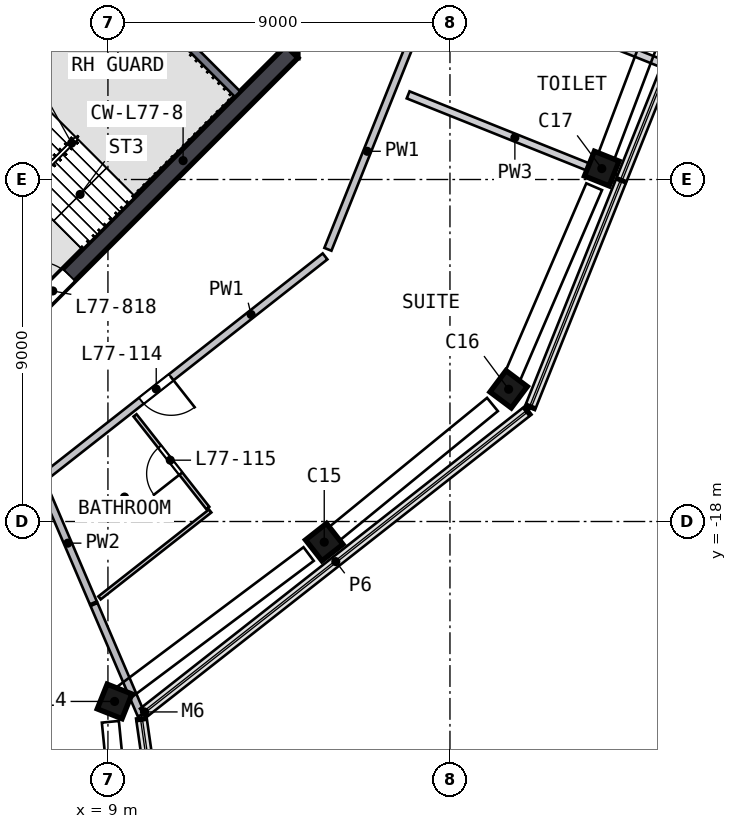
"""IFC4 building model, lengths in metres.
Left out: names, types, materials, properties, quantities, classifications, styles, units other than length and angle.
Written with IfcOpenShell. Run it as: python <this file> out.ifc"""

import sys

from ifc_helpers import new_model, si_unit, direction, frame, frame_2d, origin, origin_2d, place, context, subcontext, project, spatial, rectangle, extrude, element, fill, save


model = new_model("IFC4")
c1 = context("Model", 3, precision=1e-05, world=origin(), true_north=direction((0.0, 1.0)))
c2 = subcontext(c1, "Body", "Model", "MODEL_VIEW")
j1 = project(units=[si_unit("LENGTHUNIT", "METRE"), si_unit("PLANEANGLEUNIT", "RADIAN")], contexts=[c1])
p1 = place(None, origin())
s1 = spatial("IfcSite", under=j1, at=p1, CompositionType="ELEMENT")
p2 = place(p1, origin())
s2 = spatial("IfcBuilding", under=s1, at=p2, CompositionType="ELEMENT")
p3 = place(p2, frame((0.0, 0.0, 310.0)))
s3 = spatial("IfcBuildingStorey", under=s2, at=p3, CompositionType="ELEMENT", Elevation=310.0)
p4 = place(p3, frame((9.084, -22.772, 0.0), z_axis=(0.075798181, 0.03094343, 0.996642935), x_axis=(-0.36863657, -0.927834001, 0.056843175)))
e1 = element("IfcColumn", 1, at=p4, inside=s3, PredefinedType="COLUMN", context=c2, shape_type="SweptSolid", body=[
    extrude(rectangle(XDim=0.7, YDim=0.7, at=origin_2d()), origin(), (0.0, 0.0, 1.0), 4.615),
])
p5 = place(p3, frame((14.617, -18.602, 0.0), z_axis=(0.061742286, 0.049362085, 0.996870741), x_axis=(0.783840682, 0.615910303, -0.079046088)))
e2 = element("IfcColumn", 2, at=p5, inside=s3, PredefinedType="COLUMN", context=c2, shape_type="SweptSolid", body=[
    extrude(rectangle(XDim=0.7, YDim=0.7, at=origin_2d()), origin(), (0.0, 0.0, 1.0), 4.615),
])
p6 = place(p3, frame((19.486, -14.599, 0.0), z_axis=(0.048189355, 0.065486741, 0.996689156), x_axis=(-0.597475305, -0.797754975, 0.081303506)))
e3 = element("IfcColumn", 3, at=p6, inside=s3, PredefinedType="COLUMN", context=c2, shape_type="SweptSolid", body=[
    extrude(rectangle(XDim=0.7, YDim=0.7, at=origin_2d()), origin(), (0.0, 0.0, 1.0), 4.615),
])
p7 = place(p3, frame((21.96, -8.801, 0.0), z_axis=(0.028781386, 0.07359358, 0.996872919), x_axis=(0.370897286, 0.925306036, -0.079018619)))
e4 = element("IfcColumn", 4, at=p7, inside=s3, PredefinedType="COLUMN", context=c2, shape_type="SweptSolid", body=[
    extrude(rectangle(XDim=0.7, YDim=0.7, at=origin_2d()), origin(), (0.0, 0.0, 1.0), 4.615),
])
p8 = place(p3, frame((13.775, -5.799, 0.0), z_axis=(0.0, 0.0, 1.0), x_axis=(0.0, 1.0, 0.0)))
e5 = element("IfcWall", 5, at=p8, inside=s3, PredefinedType="SHEAR", context=c2, shape_type="SweptSolid", body=[
    extrude(rectangle(XDim=11.598, YDim=0.45, at=frame_2d((5.799, 0.0))), origin(), (0.0, 0.0, 1.0), 5.0),
])
p9 = place(p8, frame((4.899, 0.0, 0.0)))
e6 = element("IfcOpeningElement", 6, at=p9, cuts=e5, PredefinedType="OPENING", context=c2, shape_type="SweptSolid", body=[
    extrude(rectangle(XDim=1.8, YDim=2.1, at=frame_2d((0.9, 1.05))), frame((0.0, 0.235, 0.0), z_axis=(0.0, -1.0, 0.0), x_axis=(1.0, 0.0, 0.0)), (0.0, 0.0, 1.0), 0.47),
])
p10 = place(p3, frame((5.64, -13.841, 0.0), z_axis=(0.0, 0.0, 1.0), x_axis=(0.707106781, 0.707106781, 0.0)))
e7 = element("IfcWall", 7, at=p10, inside=s3, PredefinedType="SHEAR", context=c2, shape_type="SweptSolid", body=[
    extrude(rectangle(XDim=11.598, YDim=0.45, at=frame_2d((5.799, 0.0))), origin(), (0.0, 0.0, 1.0), 5.0),
])
p11 = place(p10, frame((2.099, 0.0, 0.0)))
e8 = element("IfcOpeningElement", 8, at=p11, cuts=e7, PredefinedType="OPENING", context=c2, shape_type="SweptSolid", body=[
    extrude(rectangle(XDim=1.2, YDim=2.1, at=frame_2d((0.6, 1.05))), frame((0.0, 0.235, 0.0), z_axis=(0.0, -1.0, 0.0), x_axis=(1.0, 0.0, 0.0)), (0.0, 0.0, 1.0), 0.47),
])
p12 = place(p3, frame((9.629, -3.24, 0.0), z_axis=(0.0, 0.0, 1.0), x_axis=(-0.707120946, -0.707092617, 0.0)))
e9 = element("IfcWall", 9, at=p12, inside=s3, PredefinedType="SOLIDWALL", context=c2, shape_type="SweptSolid", body=[
    extrude(rectangle(XDim=8.618, YDim=0.2, at=frame_2d((4.309, 0.0))), origin(), (0.0, 0.0, 1.0), 4.6),
])
p13 = place(p12, frame((7.018, 0.0, 0.0)))
e10 = element("IfcOpeningElement", 10, at=p13, cuts=e9, PredefinedType="OPENING", context=c2, shape_type="SweptSolid", body=[
    extrude(rectangle(XDim=1.2, YDim=2.1, at=frame_2d((0.6, 1.05))), frame((0.0, 0.11, 0.0), z_axis=(0.0, -1.0, 0.0), x_axis=(1.0, 0.0, 0.0)), (0.0, 0.0, 1.0), 0.22),
])
p14 = place(p3, frame((9.334, -3.677, 0.0), z_axis=(0.0, 0.0, 1.0), x_axis=(0.707106781, -0.707106781, 0.0)))
e11 = element("IfcWall", 11, at=p14, inside=s3, PredefinedType="SOLIDWALL", context=c2, shape_type="SweptSolid", body=[
    extrude(rectangle(XDim=4.35, YDim=0.2, at=frame_2d((2.175, 0.0))), origin(), (0.0, 0.0, 1.0), 4.6),
])
p15 = place(p3, frame((14.713, -11.023, 0.0), z_axis=(0.0, 0.0, 1.0), x_axis=(-0.78628742, -0.617860902, 0.0)))
e12 = element("IfcWall", 12, at=p15, inside=s3, PredefinedType="SOLIDWALL", context=c2, shape_type="SweptSolid", body=[
    extrude(rectangle(XDim=9.316, YDim=0.2, at=frame_2d((4.658, 0.0))), origin(), (0.0, 0.0, 1.0), 4.6),
])
p16 = place(p15, frame((5.15, 0.0, 0.0)))
e13 = element("IfcOpeningElement", 13, at=p16, cuts=e12, PredefinedType="OPENING", context=c2, shape_type="SweptSolid", body=[
    extrude(rectangle(XDim=1.0, YDim=2.1, at=frame_2d((0.5, 1.05))), frame((0.0, 0.11, 0.0), z_axis=(0.0, -1.0, 0.0), x_axis=(1.0, 0.0, 0.0)), (0.0, 0.0, 1.0), 0.22),
])
p17 = place(p3, frame((18.179, -2.375, 0.0), z_axis=(0.0, 0.0, 1.0), x_axis=(-0.37202319, -0.928223435, 0.0)))
e14 = element("IfcWall", 14, at=p17, inside=s3, PredefinedType="SOLIDWALL", context=c2, shape_type="SweptSolid", body=[
    extrude(rectangle(XDim=9.116, YDim=0.2, at=frame_2d((4.558, 0.0))), origin(), (0.0, 0.0, 1.0), 4.6),
])
p18 = place(p17, frame((2.458, 0.0, 0.0)))
e15 = element("IfcOpeningElement", 15, at=p18, cuts=e14, PredefinedType="OPENING", context=c2, shape_type="SweptSolid", body=[
    extrude(rectangle(XDim=0.9, YDim=2.1, at=frame_2d((0.45, 1.05))), frame((0.0, 0.11, 0.0), z_axis=(0.0, -1.0, 0.0), x_axis=(1.0, 0.0, 0.0)), (0.0, 0.0, 1.0), 0.22),
])
p19 = place(p17, frame((0.2, 0.0, 0.0)))
e16 = element("IfcOpeningElement", 16, at=p19, cuts=e14, PredefinedType="OPENING", context=c2, shape_type="SweptSolid", body=[
    extrude(rectangle(XDim=0.9, YDim=2.1, at=frame_2d((0.45, 1.05))), frame((0.0, 0.11, 0.0), z_axis=(0.0, -1.0, 0.0), x_axis=(1.0, 0.0, 0.0)), (0.0, 0.0, 1.0), 0.22),
])
p20 = place(p3, frame((7.271, -16.998, 0.0), z_axis=(0.0, 0.0, 1.0), x_axis=(0.393290003, -0.919414473, 0.0)))
e17 = element("IfcWall", 17, at=p20, inside=s3, PredefinedType="SOLIDWALL", context=c2, shape_type="SweptSolid", body=[
    extrude(rectangle(XDim=3.418, YDim=0.2, at=frame_2d((1.709, 0.0))), origin(), (0.0, 0.0, 1.0), 4.6),
])
p21 = place(p3, frame((8.634, -20.184, 0.0), z_axis=(0.0, 0.0, 1.0), x_axis=(0.393322695, -0.919400488, 0.0)))
e18 = element("IfcWall", 18, at=p21, inside=s3, PredefinedType="SOLIDWALL", context=c2, shape_type="SweptSolid", body=[
    extrude(rectangle(XDim=3.161, YDim=0.2, at=frame_2d((1.581, 0.0))), origin(), (0.0, 0.0, 1.0), 4.6),
])
p22 = place(p3, frame((11.69, -17.723, 0.0), z_axis=(0.0, 0.0, 1.0), x_axis=(-0.786279455, -0.617871038, 0.0)))
e19 = element("IfcWall", 19, at=p22, inside=s3, PredefinedType="PARTITIONING", context=c2, shape_type="SweptSolid", body=[
    extrude(rectangle(XDim=3.704, YDim=0.1, at=frame_2d((1.852, 0.0))), origin(), (0.0, 0.0, 1.0), 4.6),
])
p23 = place(p3, frame((11.628, -17.644, 0.0), z_axis=(0.0, 0.0, 1.0), x_axis=(-0.617842421, 0.786301941, 0.0)))
e20 = element("IfcWall", 20, at=p23, inside=s3, PredefinedType="PARTITIONING", context=c2, shape_type="SweptSolid", body=[
    extrude(rectangle(XDim=3.1, YDim=0.1, at=frame_2d((1.55, 0.0))), origin(), (0.0, 0.0, 1.0), 4.6),
])
p24 = place(p23, frame((1.15, 0.0, 0.0)))
e21 = element("IfcOpeningElement", 21, at=p24, cuts=e20, PredefinedType="OPENING", context=c2, shape_type="SweptSolid", body=[
    extrude(rectangle(XDim=0.9, YDim=2.1, at=frame_2d((0.45, 1.05))), frame((0.0, 0.06, 0.0), z_axis=(0.0, -1.0, 0.0), x_axis=(1.0, 0.0, 0.0)), (0.0, 0.0, 1.0), 0.12),
])
p25 = place(p3, frame((22.517, -9.024, 0.0), z_axis=(0.0, 0.0, 1.0), x_axis=(-0.928223329, 0.372023456, 0.0)))
e22 = element("IfcWall", 22, at=p25, inside=s3, PredefinedType="SOLIDWALL", context=c2, shape_type="SweptSolid", body=[
    extrude(rectangle(XDim=6.052, YDim=0.2, at=frame_2d((3.026, 0.0))), origin(), (0.0, 0.0, 1.0), 4.6),
])
p26 = place(p3, frame((17.878, -3.664, 0.0), z_axis=(0.0, 0.0, 1.0), x_axis=(0.928225259, -0.37201864, 0.0)))
e23 = element("IfcWall", 23, at=p26, inside=s3, PredefinedType="SOLIDWALL", context=c2, shape_type="SweptSolid", body=[
    extrude(rectangle(XDim=6.3, YDim=0.2, at=frame_2d((3.15, 0.0))), origin(), (0.0, 0.0, 1.0), 4.6),
])
p27 = place(p11, origin())
e24 = element("IfcDoor", 24, at=p27, inside=s3, OperationType="SINGLE_SWING_LEFT", PredefinedType="DOOR", context=c2, shape_type="SweptSolid", body=[
    extrude(rectangle(XDim=1.2, YDim=2.1, at=frame_2d((0.6, 1.05))), frame((0.0, 0.025, 0.0), z_axis=(0.0, -1.0, 0.0), x_axis=(1.0, 0.0, 0.0)), (0.0, 0.0, 1.0), 0.05),
])
fill(e8, e24)
p28 = place(p16, origin())
e25 = element("IfcDoor", 25, at=p28, inside=s3, OperationType="SINGLE_SWING_LEFT", PredefinedType="DOOR", context=c2, shape_type="SweptSolid", body=[
    extrude(rectangle(XDim=1.0, YDim=2.1, at=frame_2d((0.5, 1.05))), frame((0.0, 0.025, 0.0), z_axis=(0.0, -1.0, 0.0), x_axis=(1.0, 0.0, 0.0)), (0.0, 0.0, 1.0), 0.05),
])
fill(e13, e25)
p29 = place(p24, origin())
e26 = element("IfcDoor", 26, at=p29, inside=s3, OperationType="SINGLE_SWING_LEFT", PredefinedType="DOOR", context=c2, shape_type="SweptSolid", body=[
    extrude(rectangle(XDim=0.9, YDim=2.1, at=frame_2d((0.45, 1.05))), frame((0.0, 0.025, 0.0), z_axis=(0.0, -1.0, 0.0), x_axis=(1.0, 0.0, 0.0)), (0.0, 0.0, 1.0), 0.05),
])
fill(e21, e26)
save(model, sys.argv[1])
